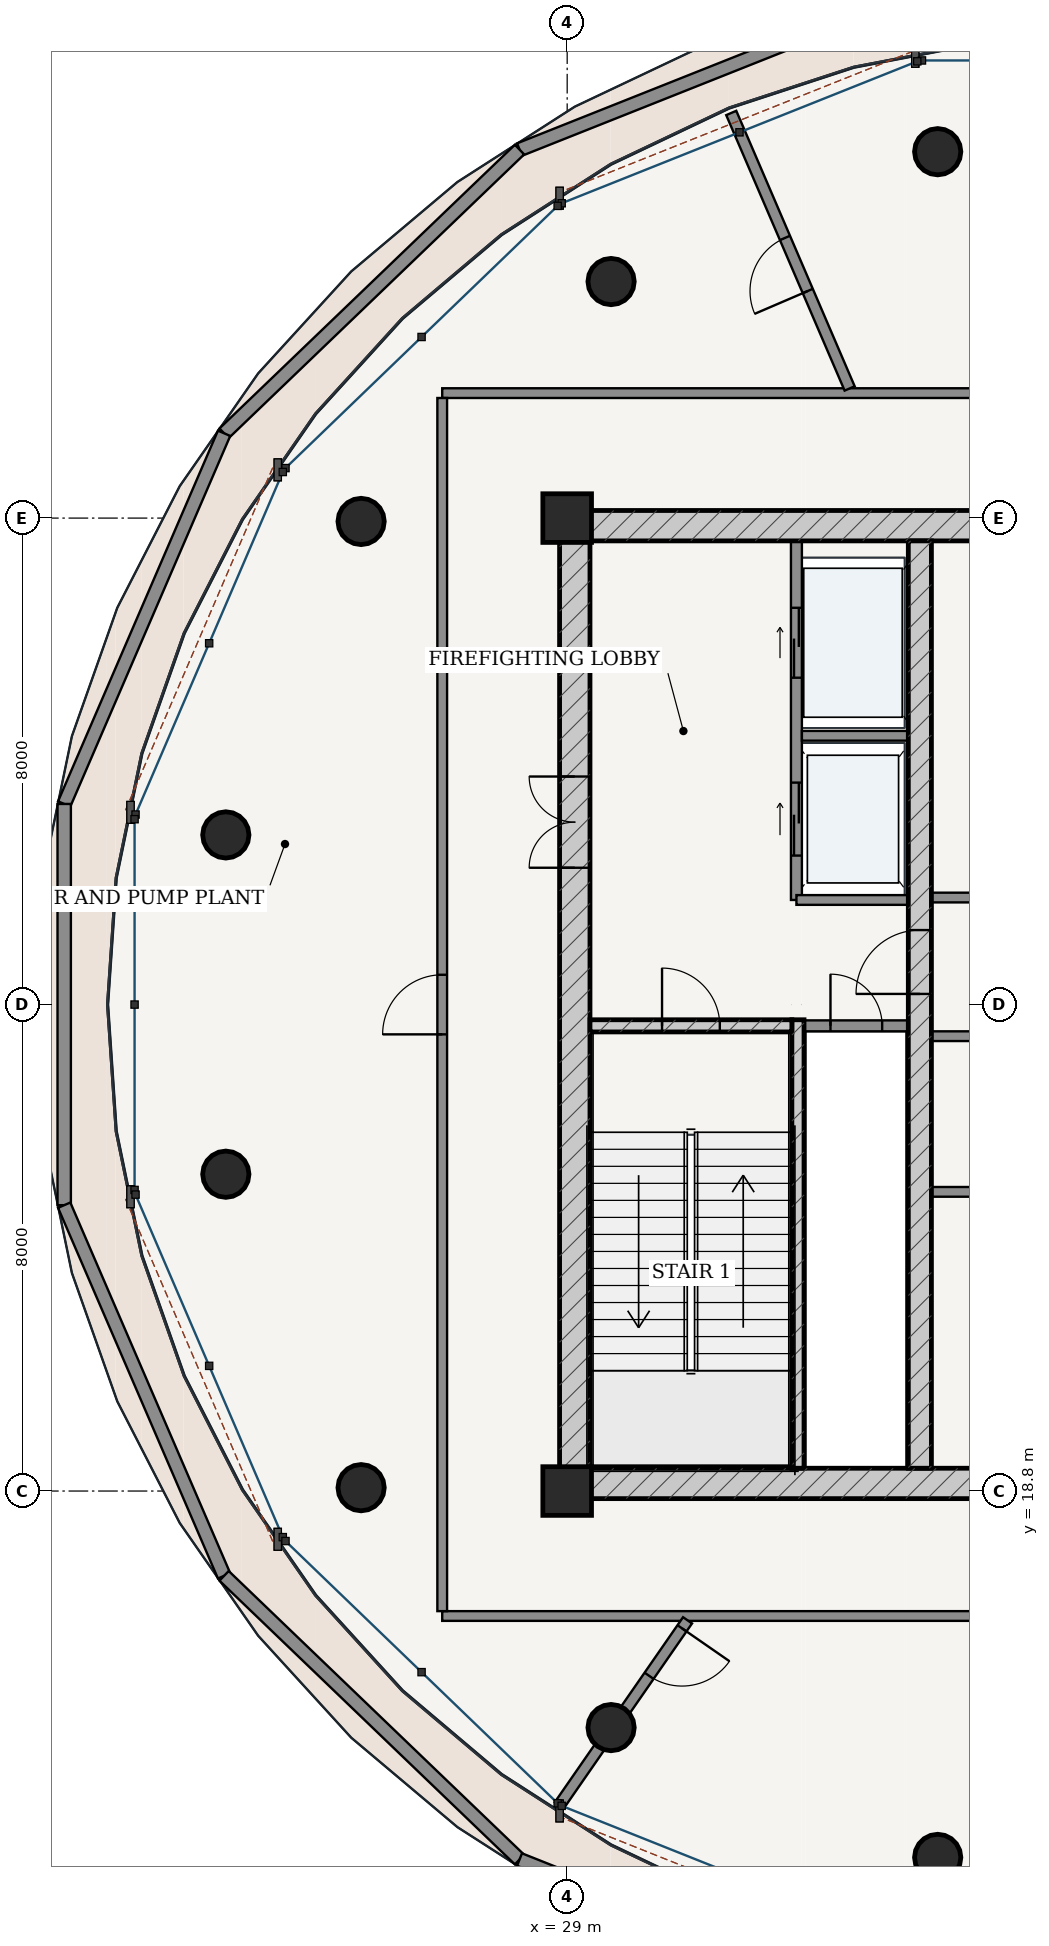
"""IFC4 building model, lengths in metres.
Left out: names, types, materials, properties, quantities, classifications, styles, units other than length and angle.
Written with IfcOpenShell. Run it as: python <this file> out.ifc"""

import sys

from ifc_helpers import new_model, si_unit, direction, frame, frame_2d, origin, origin_2d, place, context, subcontext, project, spatial, rectangle, hollow_circle, extrude, source, transform, mapped, element, fill, save


model = new_model("IFC4")
c1 = context("Model", 3, precision=1e-05, world=origin(), true_north=direction((-0.2419218956, 0.970295726276)))
c2 = subcontext(c1, "Body", "Model", "MODEL_VIEW")
j1 = project(units=[si_unit("LENGTHUNIT", "METRE"), si_unit("PLANEANGLEUNIT", "RADIAN")], contexts=[c1])
p1 = place(None, origin())
s1 = spatial("IfcSite", under=j1, at=p1, CompositionType="ELEMENT")
p2 = place(p1, origin())
s2 = spatial("IfcBuilding", under=s1, at=p2, CompositionType="ELEMENT")
p3 = place(p2, frame((0.0, 0.0, 321.7)))
s3 = spatial("IfcBuildingStorey", under=s2, at=p3, CompositionType="ELEMENT", Elevation=321.7)
for number, where, z_axis, x_axis in (
    (1, (29.0, 18.8, 0.0), (0.0, 0.0, 1.0), (1.0, 0.0, 0.0)),
    (2, (29.0, 34.8, 0.0), (0.0, 0.0, 1.0), (1.0, 0.0, 0.0)),
):
    element("IfcColumn", number, at=place(p3, frame(where, z_axis=z_axis, x_axis=x_axis)), inside=s3, PredefinedType="COLUMN", context=c2, shape_type="SweptSolid", body=[
        extrude(rectangle(XDim=0.8, YDim=0.8, at=origin_2d()), origin(), (0.0, 0.0, 1.0), 5.2),
    ])
p4 = place(p3, frame((28.875, 18.925, 0.0), z_axis=(0.0, 0.0, 1.0), x_axis=(1.0, 0.0, 0.0)))
e3 = element("IfcWall", 3, at=p4, inside=s3, PredefinedType="SHEAR", context=c2, shape_type="SweptSolid", body=[
    extrude(rectangle(XDim=18.25, YDim=0.5, at=frame_2d((9.125, 0.0))), origin(), (0.0, 0.0, 1.0), 4.78),
])
p5 = place(p4, frame((8.7, 0.0, 0.0)))
e4 = element("IfcOpeningElement", 4, at=p5, cuts=e3, PredefinedType="OPENING", context=c2, shape_type="SweptSolid", body=[
    extrude(rectangle(XDim=0.85, YDim=2.1, at=frame_2d((0.425, 1.05))), frame((0.0, 0.26, 0.0), z_axis=(0.0, -1.0, 0.0), x_axis=(1.0, 0.0, 0.0)), (0.0, 0.0, 1.0), 0.52),
])
p6 = place(p3, frame((28.875, 34.675, 0.0), z_axis=(0.0, 0.0, 1.0), x_axis=(1.0, 0.0, 0.0)))
e5 = element("IfcWall", 5, at=p6, inside=s3, PredefinedType="SHEAR", context=c2, shape_type="SweptSolid", body=[
    extrude(rectangle(XDim=18.25, YDim=0.5, at=frame_2d((9.125, 0.0))), origin(), (0.0, 0.0, 1.0), 4.78),
])
p7 = place(p3, frame((29.125, 19.175, 0.0), z_axis=(0.0, 0.0, 1.0), x_axis=(0.0, 1.0, 0.0)))
e6 = element("IfcWall", 6, at=p7, inside=s3, PredefinedType="SHEAR", context=c2, shape_type="SweptSolid", body=[
    extrude(rectangle(XDim=15.25, YDim=0.5, at=frame_2d((7.625, 0.0))), origin(), (0.0, 0.0, 1.0), 4.78),
])
p8 = place(p7, frame((9.875, 0.0, 0.0)))
e7 = element("IfcOpeningElement", 7, at=p8, cuts=e6, PredefinedType="OPENING", context=c2, shape_type="SweptSolid", body=[
    extrude(rectangle(XDim=1.5, YDim=2.2, at=frame_2d((0.75, 1.1))), frame((0.0, 0.26, 0.0), z_axis=(0.0, -1.0, 0.0), x_axis=(1.0, 0.0, 0.0)), (0.0, 0.0, 1.0), 0.52),
])
p9 = place(p3, frame((32.795, 19.175, 0.0), z_axis=(0.0, 0.0, 1.0), x_axis=(0.0, 1.0, 0.0)))
e8 = element("IfcWall", 8, at=p9, inside=s3, PredefinedType="SOLIDWALL", context=c2, shape_type="SweptSolid", body=[
    extrude(rectangle(XDim=7.375, YDim=0.2, at=frame_2d((3.688, 0.0))), origin(), (0.0, 0.0, 1.0), 4.78),
])
p10 = place(p3, frame((29.375, 26.45, 0.0), z_axis=(0.0, 0.0, 1.0), x_axis=(1.0, 0.0, 0.0)))
e9 = element("IfcWall", 9, at=p10, inside=s3, PredefinedType="SOLIDWALL", context=c2, shape_type="SweptSolid", body=[
    extrude(rectangle(XDim=3.32, YDim=0.2, at=frame_2d((1.66, 0.0))), origin(), (0.0, 0.0, 1.0), 4.78),
])
p11 = place(p10, frame((1.185, 0.0, 0.0)))
e10 = element("IfcOpeningElement", 10, at=p11, cuts=e9, PredefinedType="OPENING", context=c2, shape_type="SweptSolid", body=[
    extrude(rectangle(XDim=0.95, YDim=2.15, at=frame_2d((0.475, 1.075))), frame((0.0, 0.11, 0.0), z_axis=(0.0, -1.0, 0.0), x_axis=(1.0, 0.0, 0.0)), (0.0, 0.0, 1.0), 0.22),
])
p12 = place(p3, frame((34.8, 19.175, 0.0), z_axis=(0.0, 0.0, 1.0), x_axis=(0.0, 1.0, 0.0)))
e11 = element("IfcWall", 11, at=p12, inside=s3, PredefinedType="SHEAR", context=c2, shape_type="SweptSolid", body=[
    extrude(rectangle(XDim=15.25, YDim=0.38, at=frame_2d((7.625, 0.0))), origin(), (0.0, 0.0, 1.0), 4.78),
])
p13 = place(p12, frame((7.8, 0.0, 0.0)))
e12 = element("IfcOpeningElement", 12, at=p13, cuts=e11, PredefinedType="OPENING", context=c2, shape_type="SweptSolid", body=[
    extrude(rectangle(XDim=1.05, YDim=2.15, at=frame_2d((0.525, 1.075))), frame((0.0, 0.2, 0.0), z_axis=(0.0, -1.0, 0.0), x_axis=(1.0, 0.0, 0.0)), (0.0, 0.0, 1.0), 0.4),
])
for number, where, z_axis, x_axis in (
    (13, (35.093, 40.825, 0.0), (0.0, 0.0, 1.0), (1.0, 0.0, 0.0)),
    (14, (29.722, 38.69, 0.0), (0.0, 0.0, 1.0), (1.0, 0.0, 0.0)),
    (15, (25.611, 34.745, 0.0), (0.0, 0.0, 1.0), (1.0, 0.0, 0.0)),
    (16, (23.386, 29.59, 0.0), (0.0, 0.0, 1.0), (1.0, 0.0, 0.0)),
    (17, (23.386, 24.01, 0.0), (0.0, 0.0, 1.0), (1.0, 0.0, 0.0)),
    (18, (25.611, 18.855, 0.0), (0.0, 0.0, 1.0), (1.0, 0.0, 0.0)),
    (19, (29.722, 14.91, 0.0), (0.0, 0.0, 1.0), (1.0, 0.0, 0.0)),
    (20, (35.093, 12.775, 0.0), (0.0, 0.0, 1.0), (1.0, 0.0, 0.0)),
):
    element("IfcColumn", number, at=place(p3, frame(where, z_axis=z_axis, x_axis=x_axis)), inside=s3, PredefinedType="COLUMN", context=c2, shape_type="SweptSolid", body=[
        extrude(hollow_circle(Radius=0.381, WallThickness=0.028, at=origin_2d()), origin(), (0.0, 0.0, 1.0), 5.2),
    ])
p14 = place(p3, frame((34.564, 43.385, 0.0), z_axis=(0.0, 0.0, 1.0), x_axis=(-0.929199495848, -0.369578539576, 0.0)))
e21 = element("IfcWall", 21, at=p14, inside=s3, PredefinedType="PARAPET", context=c2, shape_type="SweptSolid", body=[
    extrude(rectangle(XDim=6.832, YDim=0.22, at=frame_2d((3.416, 0.0))), origin(), (0.0, 0.0, 1.0), 1.15),
])
p15 = place(p3, frame((28.216, 40.86, 0.0), z_axis=(0.0, 0.0, 1.0), x_axis=(-0.721278667214, -0.69264499148, 0.0)))
e22 = element("IfcWall", 22, at=p15, inside=s3, PredefinedType="PARAPET", context=c2, shape_type="SweptSolid", body=[
    extrude(rectangle(XDim=6.736, YDim=0.22, at=frame_2d((3.368, 0.0))), origin(), (0.0, 0.0, 1.0), 1.15),
])
p16 = place(p3, frame((23.358, 36.195, 0.0), z_axis=(0.0, 0.0, 1.0), x_axis=(-0.396106310231, -0.918204656378, 0.0)))
e23 = element("IfcWall", 23, at=p16, inside=s3, PredefinedType="PARAPET", context=c2, shape_type="SweptSolid", body=[
    extrude(rectangle(XDim=6.639, YDim=0.22, at=frame_2d((3.319, 0.0))), origin(), (0.0, 0.0, 1.0), 1.15),
])
p17 = place(p3, frame((20.728, 30.099, 0.0), z_axis=(0.0, 0.0, 1.0), x_axis=(0.0, -1.0, 0.0)))
e24 = element("IfcWall", 24, at=p17, inside=s3, PredefinedType="PARAPET", context=c2, shape_type="SweptSolid", body=[
    extrude(rectangle(XDim=6.598, YDim=0.22, at=frame_2d((3.299, 0.0))), origin(), (0.0, 0.0, 1.0), 1.15),
])
p18 = place(p3, frame((20.728, 23.501, 0.0), z_axis=(0.0, 0.0, 1.0), x_axis=(0.396106310231, -0.918204656378, 0.0)))
e25 = element("IfcWall", 25, at=p18, inside=s3, PredefinedType="PARAPET", context=c2, shape_type="SweptSolid", body=[
    extrude(rectangle(XDim=6.639, YDim=0.22, at=frame_2d((3.319, 0.0))), origin(), (0.0, 0.0, 1.0), 1.15),
])
p19 = place(p3, frame((23.358, 17.405, 0.0), z_axis=(0.0, 0.0, 1.0), x_axis=(0.721278667214, -0.69264499148, 0.0)))
e26 = element("IfcWall", 26, at=p19, inside=s3, PredefinedType="PARAPET", context=c2, shape_type="SweptSolid", body=[
    extrude(rectangle(XDim=6.736, YDim=0.22, at=frame_2d((3.368, 0.0))), origin(), (0.0, 0.0, 1.0), 1.15),
])
p20 = place(p3, frame((28.216, 12.74, 0.0), z_axis=(0.0, 0.0, 1.0), x_axis=(0.929199495848, -0.369578539576, 0.0)))
e27 = element("IfcWall", 27, at=p20, inside=s3, PredefinedType="PARAPET", context=c2, shape_type="SweptSolid", body=[
    extrude(rectangle(XDim=6.832, YDim=0.22, at=frame_2d((3.416, 0.0))), origin(), (0.0, 0.0, 1.0), 1.15),
])
p21 = place(p3, frame((32.9, 26.45, 0.0), z_axis=(0.0, 0.0, 1.0), x_axis=(1.0, 0.0, 0.0)))
e28 = element("IfcWall", 28, at=p21, inside=s3, PredefinedType="PARTITIONING", context=c2, shape_type="SweptSolid", body=[
    extrude(rectangle(XDim=1.71, YDim=0.18, at=frame_2d((0.855, 0.0))), origin(), (0.0, 0.0, 1.0), 4.78),
])
p22 = place(p21, frame((0.43, 0.0, 0.0)))
e29 = element("IfcOpeningElement", 29, at=p22, cuts=e28, PredefinedType="OPENING", context=c2, shape_type="SweptSolid", body=[
    extrude(rectangle(XDim=0.85, YDim=2.1, at=frame_2d((0.425, 1.05))), frame((0.0, 0.1, 0.0), z_axis=(0.0, -1.0, 0.0), x_axis=(1.0, 0.0, 0.0)), (0.0, 0.0, 1.0), 0.2),
])
p23 = place(p3, frame((32.77, 28.52, 0.0), z_axis=(0.0, 0.0, 1.0), x_axis=(0.0, 1.0, 0.0)))
e30 = element("IfcWall", 30, at=p23, inside=s3, PredefinedType="PARTITIONING", context=c2, shape_type="SweptSolid", body=[
    extrude(rectangle(XDim=5.905, YDim=0.18, at=frame_2d((2.953, 0.0))), origin(), (0.0, 0.0, 1.0), 4.78),
])
p24 = place(p23, frame((3.655, 0.0, 0.0)))
e31 = element("IfcOpeningElement", 31, at=p24, cuts=e30, PredefinedType="OPENING", context=c2, shape_type="SweptSolid", body=[
    extrude(rectangle(XDim=1.15, YDim=2.2, at=frame_2d((0.575, 1.1))), frame((0.0, 0.1, 0.0), z_axis=(0.0, -1.0, 0.0), x_axis=(1.0, 0.0, 0.0)), (0.0, 0.0, 1.0), 0.2),
])
p25 = place(p23, frame((0.73, 0.0, 0.0)))
e32 = element("IfcOpeningElement", 32, at=p25, cuts=e30, PredefinedType="OPENING", context=c2, shape_type="SweptSolid", body=[
    extrude(rectangle(XDim=1.2, YDim=2.25, at=frame_2d((0.6, 1.125))), frame((0.0, 0.1, 0.0), z_axis=(0.0, -1.0, 0.0), x_axis=(1.0, 0.0, 0.0)), (0.0, 0.0, 1.0), 0.2),
])
p26 = place(p3, frame((32.86, 31.22, 0.0), z_axis=(0.0, 0.0, 1.0), x_axis=(1.0, 0.0, 0.0)))
e33 = element("IfcWall", 33, at=p26, inside=s3, PredefinedType="PARTITIONING", context=c2, shape_type="SweptSolid", body=[
    extrude(rectangle(XDim=1.75, YDim=0.16, at=frame_2d((0.875, 0.0))), origin(), (0.0, 0.0, 1.0), 4.78),
])
p27 = place(p3, frame((32.77, 28.52, 0.0), z_axis=(0.0, 0.0, 1.0), x_axis=(1.0, 0.0, 0.0)))
e34 = element("IfcWall", 34, at=p27, inside=s3, PredefinedType="PARTITIONING", context=c2, shape_type="SweptSolid", body=[
    extrude(rectangle(XDim=1.84, YDim=0.16, at=frame_2d((0.92, 0.0))), origin(), (0.0, 0.0, 1.0), 4.78),
])
p28 = place(p3, frame((34.99, 28.56, 0.0), z_axis=(0.0, 0.0, 1.0), x_axis=(1.0, 0.0, 0.0)))
e35 = element("IfcWall", 35, at=p28, inside=s3, PredefinedType="PARTITIONING", context=c2, shape_type="SweptSolid", body=[
    extrude(rectangle(XDim=6.02, YDim=0.16, at=frame_2d((3.01, 0.0))), origin(), (0.0, 0.0, 1.0), 4.78),
])
p29 = place(p28, frame((2.585, 0.0, 0.0)))
e36 = element("IfcOpeningElement", 36, at=p29, cuts=e35, PredefinedType="OPENING", context=c2, shape_type="SweptSolid", body=[
    extrude(rectangle(XDim=0.85, YDim=2.1, at=frame_2d((0.425, 1.05))), frame((0.0, 0.09, 0.0), z_axis=(0.0, -1.0, 0.0), x_axis=(1.0, 0.0, 0.0)), (0.0, 0.0, 1.0), 0.18),
])
p30 = place(p3, frame((34.99, 26.28, 0.0), z_axis=(0.0, 0.0, 1.0), x_axis=(1.0, 0.0, 0.0)))
e37 = element("IfcWall", 37, at=p30, inside=s3, PredefinedType="PARTITIONING", context=c2, shape_type="SweptSolid", body=[
    extrude(rectangle(XDim=6.02, YDim=0.16, at=frame_2d((3.01, 0.0))), origin(), (0.0, 0.0, 1.0), 4.78),
])
p31 = place(p30, frame((1.045, 0.0, 0.0)))
e38 = element("IfcOpeningElement", 38, at=p31, cuts=e37, PredefinedType="OPENING", context=c2, shape_type="SweptSolid", body=[
    extrude(rectangle(XDim=0.85, YDim=2.1, at=frame_2d((0.425, 1.05))), frame((0.0, 0.09, 0.0), z_axis=(0.0, -1.0, 0.0), x_axis=(1.0, 0.0, 0.0)), (0.0, 0.0, 1.0), 0.18),
])
p32 = place(p30, frame((4.125, 0.0, 0.0)))
e39 = element("IfcOpeningElement", 39, at=p32, cuts=e37, PredefinedType="OPENING", context=c2, shape_type="SweptSolid", body=[
    extrude(rectangle(XDim=0.85, YDim=2.1, at=frame_2d((0.425, 1.05))), frame((0.0, 0.09, 0.0), z_axis=(0.0, -1.0, 0.0), x_axis=(1.0, 0.0, 0.0)), (0.0, 0.0, 1.0), 0.18),
])
p33 = place(p3, frame((34.99, 23.72, 0.0), z_axis=(0.0, 0.0, 1.0), x_axis=(1.0, 0.0, 0.0)))
e40 = element("IfcWall", 40, at=p33, inside=s3, PredefinedType="PARTITIONING", context=c2, shape_type="SweptSolid", body=[
    extrude(rectangle(XDim=6.02, YDim=0.16, at=frame_2d((3.01, 0.0))), origin(), (0.0, 0.0, 1.0), 4.78),
])
p34 = place(p3, frame((26.945, 16.745, 0.0), z_axis=(0.0, 0.0, 1.0), x_axis=(1.0, 0.0, 0.0)))
e41 = element("IfcWall", 41, at=p34, inside=s3, PredefinedType="PARTITIONING", context=c2, shape_type="SweptSolid", body=[
    extrude(rectangle(XDim=22.11, YDim=0.16, at=frame_2d((11.055, 0.0))), origin(), (0.0, 0.0, 1.0), 4.352),
])
p35 = place(p34, frame((12.424, 0.0, 0.0)))
e42 = element("IfcOpeningElement", 42, at=p35, cuts=e41, PredefinedType="OPENING", context=c2, shape_type="SweptSolid", body=[
    extrude(rectangle(XDim=0.98, YDim=2.2, at=frame_2d((0.49, 1.1))), frame((0.0, 0.09, 0.0), z_axis=(0.0, -1.0, 0.0), x_axis=(1.0, 0.0, 0.0)), (0.0, 0.0, 1.0), 0.18),
])
p36 = place(p3, frame((26.945, 36.855, 0.0), z_axis=(0.0, 0.0, 1.0), x_axis=(1.0, 0.0, 0.0)))
e43 = element("IfcWall", 43, at=p36, inside=s3, PredefinedType="PARTITIONING", context=c2, shape_type="SweptSolid", body=[
    extrude(rectangle(XDim=22.11, YDim=0.16, at=frame_2d((11.055, 0.0))), origin(), (0.0, 0.0, 1.0), 4.352),
])
p37 = place(p36, frame((13.768, 0.0, 0.0)))
e44 = element("IfcOpeningElement", 44, at=p37, cuts=e43, PredefinedType="OPENING", context=c2, shape_type="SweptSolid", body=[
    extrude(rectangle(XDim=0.98, YDim=2.2, at=frame_2d((0.49, 1.1))), frame((0.0, 0.09, 0.0), z_axis=(0.0, -1.0, 0.0), x_axis=(1.0, 0.0, 0.0)), (0.0, 0.0, 1.0), 0.18),
])
p38 = place(p3, frame((26.945, 16.825, 0.0), z_axis=(0.0, 0.0, 1.0), x_axis=(0.0, 1.0, 0.0)))
e45 = element("IfcWall", 45, at=p38, inside=s3, PredefinedType="PARTITIONING", context=c2, shape_type="SweptSolid", body=[
    extrude(rectangle(XDim=19.95, YDim=0.16, at=frame_2d((9.975, 0.0))), origin(), (0.0, 0.0, 1.0), 4.352),
])
p39 = place(p38, frame((9.485, 0.0, 0.0)))
e46 = element("IfcOpeningElement", 46, at=p39, cuts=e45, PredefinedType="OPENING", context=c2, shape_type="SweptSolid", body=[
    extrude(rectangle(XDim=0.98, YDim=2.2, at=frame_2d((0.49, 1.1))), frame((0.0, 0.09, 0.0), z_axis=(0.0, -1.0, 0.0), x_axis=(1.0, 0.0, 0.0)), (0.0, 0.0, 1.0), 0.18),
])
p40 = place(p3, frame((33.645, 36.932, 0.0), z_axis=(0.0, 0.0, 1.0), x_axis=(-0.394839297391, 0.918750199584, 0.0)))
e47 = element("IfcWall", 47, at=p40, inside=s3, PredefinedType="PARTITIONING", context=c2, shape_type="SweptSolid", body=[
    extrude(rectangle(XDim=4.931, YDim=0.18, at=frame_2d((2.466, 0.0))), origin(), (0.0, 0.0, 1.0), 4.411),
])
p41 = place(p40, frame((1.744, 0.0, 0.0)))
e48 = element("IfcOpeningElement", 48, at=p41, cuts=e47, PredefinedType="OPENING", context=c2, shape_type="SweptSolid", body=[
    extrude(rectangle(XDim=0.95, YDim=2.15, at=frame_2d((0.475, 1.075))), frame((0.0, 0.1, 0.0), z_axis=(0.0, -1.0, 0.0), x_axis=(1.0, 0.0, 0.0)), (0.0, 0.0, 1.0), 0.2),
])
p42 = place(p3, frame((30.979, 16.674, 0.0), z_axis=(0.0, 0.0, 1.0), x_axis=(-0.569738046405, -0.82182635543, 0.0)))
e49 = element("IfcWall", 49, at=p42, inside=s3, PredefinedType="PARTITIONING", context=c2, shape_type="SweptSolid", body=[
    extrude(rectangle(XDim=3.701, YDim=0.18, at=frame_2d((1.851, 0.0))), origin(), (0.0, 0.0, 1.0), 4.352),
])
p43 = place(p42, frame((0.16, 0.0, 0.0)))
e50 = element("IfcOpeningElement", 50, at=p43, cuts=e49, PredefinedType="OPENING", context=c2, shape_type="SweptSolid", body=[
    extrude(rectangle(XDim=0.95, YDim=2.15, at=frame_2d((0.475, 1.075))), frame((0.0, 0.1, 0.0), z_axis=(0.0, -1.0, 0.0), x_axis=(1.0, 0.0, 0.0)), (0.0, 0.0, 1.0), 0.2),
])
m1 = source(origin(), c2, "Body", "SweptSolid", [
    extrude(rectangle(XDim=1.5, YDim=2.2, at=frame_2d((0.75, 1.1))), frame((0.0, 0.025, 0.0), z_axis=(0.0, -1.0, 0.0), x_axis=(1.0, 0.0, 0.0)), (0.0, 0.0, 1.0), 0.05),
])
p44 = place(p8, origin())
e51 = element("IfcDoor", 51, at=p44, inside=s3, OperationType="DOUBLE_DOOR_SINGLE_SWING", PredefinedType="DOOR", context=c2, shape_type="MappedRepresentation", body=[
    mapped(m1, transform((0.0, 0.0, 0.0), scale=1.0)),
])
fill(e7, e51)
m2 = source(origin(), c2, "Body", "SweptSolid", [
    extrude(rectangle(XDim=1.05, YDim=2.15, at=frame_2d((0.525, 1.075))), frame((0.0, 0.025, 0.0), z_axis=(0.0, -1.0, 0.0), x_axis=(1.0, 0.0, 0.0)), (0.0, 0.0, 1.0), 0.05),
])
p45 = place(p13, origin())
e52 = element("IfcDoor", 52, at=p45, inside=s3, OperationType="SINGLE_SWING_LEFT", PredefinedType="DOOR", context=c2, shape_type="MappedRepresentation", body=[
    mapped(m2, transform((0.0, 0.0, 0.0), scale=1.0)),
])
fill(e12, e52)
m3 = source(origin(), c2, "Body", "SweptSolid", [
    extrude(rectangle(XDim=0.95, YDim=2.15, at=frame_2d((0.475, 1.075))), frame((0.0, 0.025, 0.0), z_axis=(0.0, -1.0, 0.0), x_axis=(1.0, 0.0, 0.0)), (0.0, 0.0, 1.0), 0.05),
])
p46 = place(p11, origin())
e53 = element("IfcDoor", 53, at=p46, inside=s3, OperationType="SINGLE_SWING_LEFT", PredefinedType="DOOR", context=c2, shape_type="MappedRepresentation", body=[
    mapped(m3, transform((0.0, 0.0, 0.0), scale=1.0)),
])
fill(e10, e53)
m4 = source(origin(), c2, "Body", "SweptSolid", [
    extrude(rectangle(XDim=0.85, YDim=2.1, at=frame_2d((0.425, 1.05))), frame((0.0, 0.025, 0.0), z_axis=(0.0, -1.0, 0.0), x_axis=(1.0, 0.0, 0.0)), (0.0, 0.0, 1.0), 0.05),
])
p47 = place(p22, origin())
e54 = element("IfcDoor", 54, at=p47, inside=s3, OperationType="SINGLE_SWING_LEFT", PredefinedType="DOOR", context=c2, shape_type="MappedRepresentation", body=[
    mapped(m4, transform((0.0, 0.0, 0.0), scale=1.0)),
])
fill(e29, e54)
m5 = source(origin(), c2, "Body", "SweptSolid", [
    extrude(rectangle(XDim=1.15, YDim=2.2, at=frame_2d((0.575, 1.1))), frame((0.0, 0.025, 0.0), z_axis=(0.0, -1.0, 0.0), x_axis=(1.0, 0.0, 0.0)), (0.0, 0.0, 1.0), 0.05),
])
p48 = place(p24, origin())
e55 = element("IfcDoor", 55, at=p48, inside=s3, OperationType="DOUBLE_DOOR_SLIDING", PredefinedType="DOOR", context=c2, shape_type="MappedRepresentation", body=[
    mapped(m5, transform((0.0, 0.0, 0.0), scale=1.0)),
])
fill(e31, e55)
m6 = source(origin(), c2, "Body", "SweptSolid", [
    extrude(rectangle(XDim=1.2, YDim=2.25, at=frame_2d((0.6, 1.125))), frame((0.0, 0.025, 0.0), z_axis=(0.0, -1.0, 0.0), x_axis=(1.0, 0.0, 0.0)), (0.0, 0.0, 1.0), 0.05),
])
p49 = place(p25, origin())
e56 = element("IfcDoor", 56, at=p49, inside=s3, OperationType="DOUBLE_DOOR_SLIDING", PredefinedType="DOOR", context=c2, shape_type="MappedRepresentation", body=[
    mapped(m6, transform((0.0, 0.0, 0.0), scale=1.0)),
])
fill(e32, e56)
m7 = source(origin(), c2, "Body", "SweptSolid", [
    extrude(rectangle(XDim=0.98, YDim=2.2, at=frame_2d((0.49, 1.1))), frame((0.0, 0.025, 0.0), z_axis=(0.0, -1.0, 0.0), x_axis=(1.0, 0.0, 0.0)), (0.0, 0.0, 1.0), 0.05),
])
p50 = place(p39, origin())
e57 = element("IfcDoor", 57, at=p50, inside=s3, OperationType="SINGLE_SWING_LEFT", PredefinedType="DOOR", context=c2, shape_type="MappedRepresentation", body=[
    mapped(m7, transform((0.0, 0.0, 0.0), scale=1.0)),
])
fill(e46, e57)
p51 = place(p41, origin())
e58 = element("IfcDoor", 58, at=p51, inside=s3, OperationType="SINGLE_SWING_LEFT", PredefinedType="DOOR", context=c2, shape_type="MappedRepresentation", body=[
    mapped(m3, transform((0.0, 0.0, 0.0), scale=1.0)),
])
fill(e48, e58)
p52 = place(p43, origin())
e59 = element("IfcDoor", 59, at=p52, inside=s3, OperationType="SINGLE_SWING_LEFT", PredefinedType="DOOR", context=c2, shape_type="MappedRepresentation", body=[
    mapped(m3, transform((0.0, 0.0, 0.0), scale=1.0)),
])
fill(e50, e59)
save(model, sys.argv[1])
